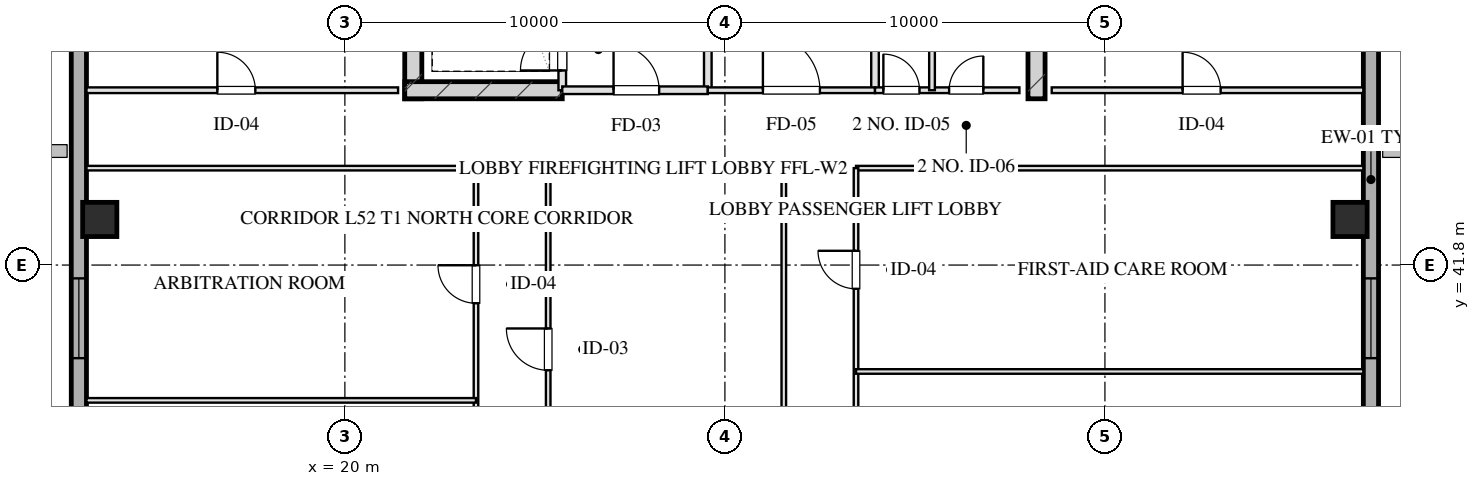
"""IFC4 building model, lengths in metres.
Left out: names, types, materials, properties, quantities, classifications, styles, units other than length and angle.
Written with IfcOpenShell. Run it as: python <this file> out.ifc"""

import sys

from ifc_helpers import new_model, si_unit, direction, frame, frame_2d, origin, origin_2d, place, context, subcontext, project, spatial, rectangle, hollow_rectangle, extrude, element, fill, save


model = new_model("IFC4")
c1 = context("Model", 3, precision=1e-05, world=origin(), true_north=direction((0.0, 1.0)))
c2 = subcontext(c1, "Body", "Model", "MODEL_VIEW")
j1 = project(units=[si_unit("LENGTHUNIT", "METRE"), si_unit("PLANEANGLEUNIT", "RADIAN")], contexts=[c1])
p1 = place(None, origin())
s1 = spatial("IfcSite", under=j1, at=p1, CompositionType="ELEMENT")
p2 = place(p1, origin())
s2 = spatial("IfcBuilding", under=s1, at=p2, CompositionType="ELEMENT")
p3 = place(p2, frame((0.0, 0.0, 195.5)))
s3 = spatial("IfcBuildingStorey", under=s2, at=p3, CompositionType="ELEMENT", Elevation=195.5)
for number, where, z_axis, x_axis in (
    (1, (21.8, 46.175, 0.0), (0.0, 0.0, 1.0), (0.0, 1.0, 0.0)),
    (2, (38.2, 46.175, 0.0), (0.0, 0.0, 1.0), (0.0, 1.0, 0.0)),
):
    element("IfcWall", number, at=place(p3, frame(where, z_axis=z_axis, x_axis=x_axis)), inside=s3, PredefinedType="SHEAR", context=c2, shape_type="SweptSolid", body=[
        extrude(rectangle(XDim=9.33, YDim=0.45, at=frame_2d((4.665, 0.0))), origin(), (0.0, 0.0, 1.0), 3.45),
    ])
p4 = place(p3, frame((21.575, 46.4, 0.0), z_axis=(0.0, 0.0, 1.0), x_axis=(1.0, 0.0, 0.0)))
e3 = element("IfcWall", 3, at=p4, inside=s3, PredefinedType="SHEAR", context=c2, shape_type="SweptSolid", body=[
    extrude(rectangle(XDim=4.145, YDim=0.45, at=frame_2d((2.073, 0.0))), origin(), (0.0, 0.0, 1.0), 3.45),
])
for number, where, z_axis, x_axis in (
    (4, (13.55, 43.0, 0.0), (0.0, 0.0, 1.0), (1.0, 0.0, 0.0)),
    (5, (46.45, 43.0, 0.0), (0.0, 0.0, 1.0), (1.0, 0.0, 0.0)),
):
    element("IfcColumn", number, at=place(p3, frame(where, z_axis=z_axis, x_axis=x_axis)), inside=s3, PredefinedType="COLUMN", context=c2, shape_type="SweptSolid", body=[
        extrude(hollow_rectangle(XDim=0.9, YDim=0.9, WallThickness=0.032, at=origin_2d()), origin(), (0.0, 0.0, 1.0), 3.451),
    ])
p5 = place(p3, frame((13.0, 10.8, 0.0), z_axis=(0.0, 0.0, 1.0), x_axis=(0.0, 1.0, 0.0)))
e6 = element("IfcWall", 6, at=p5, inside=s3, PredefinedType="SOLIDWALL", context=c2, shape_type="SweptSolid", body=[
    extrude(rectangle(XDim=46.4, YDim=0.4, at=frame_2d((23.2, 0.0))), origin(), (0.0, 0.0, 1.0), 2.61),
])
p6 = place(p5, frame((24.75, 0.0, 0.75)))
e7 = element("IfcOpeningElement", 7, at=p6, cuts=e6, PredefinedType="OPENING", context=c2, shape_type="SweptSolid", body=[
    extrude(rectangle(XDim=2.1, YDim=1.46, at=frame_2d((1.05, 0.73))), frame((0.0, 0.21, 0.0), z_axis=(0.0, -1.0, 0.0), x_axis=(1.0, 0.0, 0.0)), (0.0, 0.0, 1.0), 0.42),
])
p7 = place(p5, frame((28.55, 0.0, 0.75)))
e8 = element("IfcOpeningElement", 8, at=p7, cuts=e6, PredefinedType="OPENING", context=c2, shape_type="SweptSolid", body=[
    extrude(rectangle(XDim=2.1, YDim=1.46, at=frame_2d((1.05, 0.73))), frame((0.0, 0.21, 0.0), z_axis=(0.0, -1.0, 0.0), x_axis=(1.0, 0.0, 0.0)), (0.0, 0.0, 1.0), 0.42),
])
p8 = place(p5, frame((19.55, 0.0, 0.0)))
e9 = element("IfcOpeningElement", 9, at=p8, cuts=e6, PredefinedType="OPENING", context=c2, shape_type="SweptSolid", body=[
    extrude(rectangle(XDim=1.1, YDim=2.15, at=frame_2d((0.55, 1.075))), frame((0.0, 0.21, 0.0), z_axis=(0.0, -1.0, 0.0), x_axis=(1.0, 0.0, 0.0)), (0.0, 0.0, 1.0), 0.42),
])
p9 = place(p3, frame((47.0, 57.2, 0.0), z_axis=(0.0, 0.0, 1.0), x_axis=(0.0, -1.0, 0.0)))
e10 = element("IfcWall", 10, at=p9, inside=s3, PredefinedType="SOLIDWALL", context=c2, shape_type="SweptSolid", body=[
    extrude(rectangle(XDim=46.4, YDim=0.4, at=frame_2d((23.2, 0.0))), origin(), (0.0, 0.0, 1.0), 2.61),
])
p10 = place(p9, frame((19.55, 0.0, 0.75)))
e11 = element("IfcOpeningElement", 11, at=p10, cuts=e10, PredefinedType="OPENING", context=c2, shape_type="SweptSolid", body=[
    extrude(rectangle(XDim=2.1, YDim=1.46, at=frame_2d((1.05, 0.73))), frame((0.0, 0.21, 0.0), z_axis=(0.0, -1.0, 0.0), x_axis=(1.0, 0.0, 0.0)), (0.0, 0.0, 1.0), 0.42),
])
p11 = place(p9, frame((15.75, 0.0, 0.75)))
e12 = element("IfcOpeningElement", 12, at=p11, cuts=e10, PredefinedType="OPENING", context=c2, shape_type="SweptSolid", body=[
    extrude(rectangle(XDim=2.1, YDim=1.46, at=frame_2d((1.05, 0.73))), frame((0.0, 0.21, 0.0), z_axis=(0.0, -1.0, 0.0), x_axis=(1.0, 0.0, 0.0)), (0.0, 0.0, 1.0), 0.42),
])
p12 = place(p9, frame((27.05, 0.0, 0.0)))
e13 = element("IfcOpeningElement", 13, at=p12, cuts=e10, PredefinedType="OPENING", context=c2, shape_type="SweptSolid", body=[
    extrude(rectangle(XDim=1.1, YDim=2.15, at=frame_2d((0.55, 1.075))), frame((0.0, 0.21, 0.0), z_axis=(0.0, -1.0, 0.0), x_axis=(1.0, 0.0, 0.0)), (0.0, 0.0, 1.0), 0.42),
])
p13 = place(p3, frame((25.72, 46.4, 0.0), z_axis=(0.0, 0.0, 1.0), x_axis=(0.0, 1.0, 0.0)))
e14 = element("IfcWall", 14, at=p13, inside=s3, PredefinedType="PARTITIONING", context=c2, shape_type="SweptSolid", body=[
    extrude(rectangle(XDim=1.9, YDim=0.2, at=frame_2d((0.95, 0.0))), origin(), (0.0, 0.0, 1.0), 3.175),
])
p14 = place(p13, frame((0.52, 0.0, 0.0)))
e15 = element("IfcOpeningElement", 15, at=p14, cuts=e14, PredefinedType="OPENING", context=c2, shape_type="SweptSolid", body=[
    extrude(rectangle(XDim=1.1, YDim=2.05, at=frame_2d((0.55, 1.025))), frame((0.0, 0.11, 0.0), z_axis=(0.0, -1.0, 0.0), x_axis=(1.0, 0.0, 0.0)), (0.0, 0.0, 1.0), 0.22),
])
p15 = place(p3, frame((29.55, 46.4, 0.0), z_axis=(0.0, 0.0, 1.0), x_axis=(0.0, 1.0, 0.0)))
e16 = element("IfcWall", 16, at=p15, inside=s3, PredefinedType="PARTITIONING", context=c2, shape_type="SweptSolid", body=[
    extrude(rectangle(XDim=8.43, YDim=0.2, at=frame_2d((4.215, 0.0))), origin(), (0.0, 0.0, 1.0), 3.175),
])
p16 = place(p3, frame((25.72, 46.4, 0.0), z_axis=(0.0, 0.0, 1.0), x_axis=(1.0, 0.0, 0.0)))
e17 = element("IfcWall", 17, at=p16, inside=s3, PredefinedType="PARTITIONING", context=c2, shape_type="SweptSolid", body=[
    extrude(rectangle(XDim=3.83, YDim=0.2, at=frame_2d((1.915, 0.0))), origin(), (0.0, 0.0, 1.0), 3.175),
])
p17 = place(p16, frame((1.35, 0.0, 0.0)))
e18 = element("IfcOpeningElement", 18, at=p17, cuts=e17, PredefinedType="OPENING", context=c2, shape_type="SweptSolid", body=[
    extrude(rectangle(XDim=1.2, YDim=2.05, at=frame_2d((0.6, 1.025))), frame((0.0, 0.11, 0.0), z_axis=(0.0, -1.0, 0.0), x_axis=(1.0, 0.0, 0.0)), (0.0, 0.0, 1.0), 0.22),
])
p18 = place(p3, frame((33.95, 46.4, 0.0), z_axis=(0.0, 0.0, 1.0), x_axis=(0.0, 1.0, 0.0)))
e19 = element("IfcWall", 19, at=p18, inside=s3, PredefinedType="PARTITIONING", context=c2, shape_type="SweptSolid", body=[
    extrude(rectangle(XDim=8.43, YDim=0.2, at=frame_2d((4.215, 0.0))), origin(), (0.0, 0.0, 1.0), 3.175),
])
p19 = place(p3, frame((29.55, 46.4, 0.0), z_axis=(0.0, 0.0, 1.0), x_axis=(1.0, 0.0, 0.0)))
e20 = element("IfcWall", 20, at=p19, inside=s3, PredefinedType="PARTITIONING", context=c2, shape_type="SweptSolid", body=[
    extrude(rectangle(XDim=4.4, YDim=0.15, at=frame_2d((2.2, 0.0))), origin(), (0.0, 0.0, 1.0), 3.175),
])
p20 = place(p19, frame((1.45, 0.0, 0.0)))
e21 = element("IfcOpeningElement", 21, at=p20, cuts=e20, PredefinedType="OPENING", context=c2, shape_type="SweptSolid", body=[
    extrude(rectangle(XDim=1.5, YDim=2.05, at=frame_2d((0.75, 1.025))), frame((0.0, 0.085, 0.0), z_axis=(0.0, -1.0, 0.0), x_axis=(1.0, 0.0, 0.0)), (0.0, 0.0, 1.0), 0.17),
])
p21 = place(p3, frame((33.95, 46.4, 0.0), z_axis=(0.0, 0.0, 1.0), x_axis=(1.0, 0.0, 0.0)))
e22 = element("IfcWall", 22, at=p21, inside=s3, PredefinedType="PARTITIONING", context=c2, shape_type="SweptSolid", body=[
    extrude(rectangle(XDim=3.8, YDim=0.15, at=frame_2d((1.9, 0.0))), origin(), (0.0, 0.0, 1.0), 3.175),
])
p22 = place(p21, frame((0.22, 0.0, 0.0)))
e23 = element("IfcOpeningElement", 23, at=p22, cuts=e22, PredefinedType="OPENING", context=c2, shape_type="SweptSolid", body=[
    extrude(rectangle(XDim=0.95, YDim=2.05, at=frame_2d((0.475, 1.025))), frame((0.0, 0.085, 0.0), z_axis=(0.0, -1.0, 0.0), x_axis=(1.0, 0.0, 0.0)), (0.0, 0.0, 1.0), 0.17),
])
p23 = place(p21, frame((1.95, 0.0, 0.0)))
e24 = element("IfcOpeningElement", 24, at=p23, cuts=e22, PredefinedType="OPENING", context=c2, shape_type="SweptSolid", body=[
    extrude(rectangle(XDim=0.9, YDim=2.05, at=frame_2d((0.45, 1.025))), frame((0.0, 0.085, 0.0), z_axis=(0.0, -1.0, 0.0), x_axis=(1.0, 0.0, 0.0)), (0.0, 0.0, 1.0), 0.17),
])
p24 = place(p3, frame((35.45, 46.4, 0.0), z_axis=(0.0, 0.0, 1.0), x_axis=(0.0, 1.0, 0.0)))
e25 = element("IfcWall", 25, at=p24, inside=s3, PredefinedType="PARTITIONING", context=c2, shape_type="SweptSolid", body=[
    extrude(rectangle(XDim=8.43, YDim=0.15, at=frame_2d((4.215, 0.0))), origin(), (0.0, 0.0, 1.0), 2.765),
])
p25 = place(p24, frame((2.55, 0.0, 0.0)))
e26 = element("IfcOpeningElement", 26, at=p25, cuts=e25, PredefinedType="OPENING", context=c2, shape_type="SweptSolid", body=[
    extrude(rectangle(XDim=0.95, YDim=2.05, at=frame_2d((0.475, 1.025))), frame((0.0, 0.085, 0.0), z_axis=(0.0, -1.0, 0.0), x_axis=(1.0, 0.0, 0.0)), (0.0, 0.0, 1.0), 0.17),
])
p26 = place(p24, frame((5.6, 0.0, 0.0)))
e27 = element("IfcOpeningElement", 27, at=p26, cuts=e25, PredefinedType="OPENING", context=c2, shape_type="SweptSolid", body=[
    extrude(rectangle(XDim=0.9, YDim=2.05, at=frame_2d((0.45, 1.025))), frame((0.0, 0.085, 0.0), z_axis=(0.0, -1.0, 0.0), x_axis=(1.0, 0.0, 0.0)), (0.0, 0.0, 1.0), 0.17),
])
p27 = place(p3, frame((13.2, 46.4, 0.0), z_axis=(0.0, 0.0, 1.0), x_axis=(1.0, 0.0, 0.0)))
e28 = element("IfcWall", 28, at=p27, inside=s3, PredefinedType="PARTITIONING", context=c2, shape_type="SweptSolid", body=[
    extrude(rectangle(XDim=8.2, YDim=0.15, at=frame_2d((4.1, 0.0))), origin(), (0.0, 0.0, 1.0), 3.175),
])
p28 = place(p27, frame((3.444, 0.0, 0.0)))
e29 = element("IfcOpeningElement", 29, at=p28, cuts=e28, PredefinedType="OPENING", context=c2, shape_type="SweptSolid", body=[
    extrude(rectangle(XDim=1.0, YDim=2.05, at=frame_2d((0.5, 1.025))), frame((0.0, 0.085, 0.0), z_axis=(0.0, -1.0, 0.0), x_axis=(1.0, 0.0, 0.0)), (0.0, 0.0, 1.0), 0.17),
])
p29 = place(p3, frame((38.6, 46.4, 0.0), z_axis=(0.0, 0.0, 1.0), x_axis=(1.0, 0.0, 0.0)))
e30 = element("IfcWall", 30, at=p29, inside=s3, PredefinedType="PARTITIONING", context=c2, shape_type="SweptSolid", body=[
    extrude(rectangle(XDim=8.2, YDim=0.15, at=frame_2d((4.1, 0.0))), origin(), (0.0, 0.0, 1.0), 3.175),
])
p30 = place(p29, frame((3.444, 0.0, 0.0)))
e31 = element("IfcOpeningElement", 31, at=p30, cuts=e30, PredefinedType="OPENING", context=c2, shape_type="SweptSolid", body=[
    extrude(rectangle(XDim=1.0, YDim=2.05, at=frame_2d((0.5, 1.025))), frame((0.0, 0.085, 0.0), z_axis=(0.0, -1.0, 0.0), x_axis=(1.0, 0.0, 0.0)), (0.0, 0.0, 1.0), 0.17),
])
p31 = place(p3, frame((13.2, 44.35, 0.0), z_axis=(0.0, 0.0, 1.0), x_axis=(1.0, 0.0, 0.0)))
e32 = element("IfcWall", 32, at=p31, inside=s3, PredefinedType="PARTITIONING", context=c2, shape_type="SweptSolid", body=[
    extrude(rectangle(XDim=10.25, YDim=0.12, at=frame_2d((5.125, 0.0))), origin(), (0.0, 0.0, 1.0), 3.175),
])
p32 = place(p3, frame((25.35, 44.35, 0.0), z_axis=(0.0, 0.0, 1.0), x_axis=(1.0, 0.0, 0.0)))
e33 = element("IfcWall", 33, at=p32, inside=s3, PredefinedType="PARTITIONING", context=c2, shape_type="SweptSolid", body=[
    extrude(rectangle(XDim=6.2, YDim=0.12, at=frame_2d((3.1, 0.0))), origin(), (0.0, 0.0, 1.0), 3.175),
])
p33 = place(p3, frame((33.45, 44.35, 0.0), z_axis=(0.0, 0.0, 1.0), x_axis=(1.0, 0.0, 0.0)))
e34 = element("IfcWall", 34, at=p33, inside=s3, PredefinedType="PARTITIONING", context=c2, shape_type="SweptSolid", body=[
    extrude(rectangle(XDim=13.35, YDim=0.12, at=frame_2d((6.675, 0.0))), origin(), (0.0, 0.0, 1.0), 3.175),
])
p34 = place(p3, frame((23.45, 23.65, 0.0), z_axis=(0.0, 0.0, 1.0), x_axis=(0.0, 1.0, 0.0)))
e35 = element("IfcWall", 35, at=p34, inside=s3, PredefinedType="PARTITIONING", context=c2, shape_type="SweptSolid", body=[
    extrude(rectangle(XDim=20.7, YDim=0.12, at=frame_2d((10.35, 0.0))), origin(), (0.0, 0.0, 1.0), 3.175),
])
p35 = place(p34, frame((2.175, 0.0, 0.0)))
e36 = element("IfcOpeningElement", 36, at=p35, cuts=e35, PredefinedType="OPENING", context=c2, shape_type="SweptSolid", body=[
    extrude(rectangle(XDim=1.0, YDim=2.05, at=frame_2d((0.5, 1.025))), frame((0.0, 0.07, 0.0), z_axis=(0.0, -1.0, 0.0), x_axis=(1.0, 0.0, 0.0)), (0.0, 0.0, 1.0), 0.14),
])
p36 = place(p34, frame((6.883, 0.0, 0.0)))
e37 = element("IfcOpeningElement", 37, at=p36, cuts=e35, PredefinedType="OPENING", context=c2, shape_type="SweptSolid", body=[
    extrude(rectangle(XDim=1.0, YDim=2.05, at=frame_2d((0.5, 1.025))), frame((0.0, 0.07, 0.0), z_axis=(0.0, -1.0, 0.0), x_axis=(1.0, 0.0, 0.0)), (0.0, 0.0, 1.0), 0.14),
])
p37 = place(p34, frame((11.502, 0.0, 0.0)))
e38 = element("IfcOpeningElement", 38, at=p37, cuts=e35, PredefinedType="OPENING", context=c2, shape_type="SweptSolid", body=[
    extrude(rectangle(XDim=1.05, YDim=2.05, at=frame_2d((0.525, 1.025))), frame((0.0, 0.07, 0.0), z_axis=(0.0, -1.0, 0.0), x_axis=(1.0, 0.0, 0.0)), (0.0, 0.0, 1.0), 0.14),
])
p38 = place(p34, frame((17.145, 0.0, 0.0)))
e39 = element("IfcOpeningElement", 39, at=p38, cuts=e35, PredefinedType="OPENING", context=c2, shape_type="SweptSolid", body=[
    extrude(rectangle(XDim=1.0, YDim=2.05, at=frame_2d((0.5, 1.025))), frame((0.0, 0.07, 0.0), z_axis=(0.0, -1.0, 0.0), x_axis=(1.0, 0.0, 0.0)), (0.0, 0.0, 1.0), 0.14),
])
p39 = place(p3, frame((25.35, 23.65, 0.0), z_axis=(0.0, 0.0, 1.0), x_axis=(0.0, 1.0, 0.0)))
e40 = element("IfcWall", 40, at=p39, inside=s3, PredefinedType="PARTITIONING", context=c2, shape_type="SweptSolid", body=[
    extrude(rectangle(XDim=20.7, YDim=0.12, at=frame_2d((10.35, 0.0))), origin(), (0.0, 0.0, 1.0), 3.175),
])
p40 = place(p39, frame((4.963, 0.0, 0.0)))
e41 = element("IfcOpeningElement", 41, at=p40, cuts=e40, PredefinedType="OPENING", context=c2, shape_type="SweptSolid", body=[
    extrude(rectangle(XDim=1.1, YDim=2.05, at=frame_2d((0.55, 1.025))), frame((0.0, 0.07, 0.0), z_axis=(0.0, -1.0, 0.0), x_axis=(1.0, 0.0, 0.0)), (0.0, 0.0, 1.0), 0.14),
])
p41 = place(p39, frame((15.382, 0.0, 0.0)))
e42 = element("IfcOpeningElement", 42, at=p41, cuts=e40, PredefinedType="OPENING", context=c2, shape_type="SweptSolid", body=[
    extrude(rectangle(XDim=1.1, YDim=2.05, at=frame_2d((0.55, 1.025))), frame((0.0, 0.07, 0.0), z_axis=(0.0, -1.0, 0.0), x_axis=(1.0, 0.0, 0.0)), (0.0, 0.0, 1.0), 0.14),
])
p42 = place(p3, frame((31.55, 23.65, 0.0), z_axis=(0.0, 0.0, 1.0), x_axis=(0.0, 1.0, 0.0)))
e43 = element("IfcWall", 43, at=p42, inside=s3, PredefinedType="PARTITIONING", context=c2, shape_type="SweptSolid", body=[
    extrude(rectangle(XDim=20.7, YDim=0.12, at=frame_2d((10.35, 0.0))), origin(), (0.0, 0.0, 1.0), 3.175),
])
p43 = place(p3, frame((33.45, 23.65, 0.0), z_axis=(0.0, 0.0, 1.0), x_axis=(0.0, 1.0, 0.0)))
e44 = element("IfcWall", 44, at=p43, inside=s3, PredefinedType="PARTITIONING", context=c2, shape_type="SweptSolid", body=[
    extrude(rectangle(XDim=20.7, YDim=0.12, at=frame_2d((10.35, 0.0))), origin(), (0.0, 0.0, 1.0), 3.175),
])
p44 = place(p43, frame((0.775, 0.0, 0.0)))
e45 = element("IfcOpeningElement", 45, at=p44, cuts=e44, PredefinedType="OPENING", context=c2, shape_type="SweptSolid", body=[
    extrude(rectangle(XDim=1.0, YDim=2.05, at=frame_2d((0.5, 1.025))), frame((0.0, 0.07, 0.0), z_axis=(0.0, -1.0, 0.0), x_axis=(1.0, 0.0, 0.0)), (0.0, 0.0, 1.0), 0.14),
])
p45 = place(p43, frame((5.35, 0.0, 0.0)))
e46 = element("IfcOpeningElement", 46, at=p45, cuts=e44, PredefinedType="OPENING", context=c2, shape_type="SweptSolid", body=[
    extrude(rectangle(XDim=1.0, YDim=2.05, at=frame_2d((0.5, 1.025))), frame((0.0, 0.07, 0.0), z_axis=(0.0, -1.0, 0.0), x_axis=(1.0, 0.0, 0.0)), (0.0, 0.0, 1.0), 0.14),
])
p46 = place(p43, frame((9.85, 0.0, 0.0)))
e47 = element("IfcOpeningElement", 47, at=p46, cuts=e44, PredefinedType="OPENING", context=c2, shape_type="SweptSolid", body=[
    extrude(rectangle(XDim=1.0, YDim=2.05, at=frame_2d((0.5, 1.025))), frame((0.0, 0.07, 0.0), z_axis=(0.0, -1.0, 0.0), x_axis=(1.0, 0.0, 0.0)), (0.0, 0.0, 1.0), 0.14),
])
p47 = place(p43, frame((12.95, 0.0, 0.0)))
e48 = element("IfcOpeningElement", 48, at=p47, cuts=e44, PredefinedType="OPENING", context=c2, shape_type="SweptSolid", body=[
    extrude(rectangle(XDim=1.05, YDim=2.05, at=frame_2d((0.525, 1.025))), frame((0.0, 0.07, 0.0), z_axis=(0.0, -1.0, 0.0), x_axis=(1.0, 0.0, 0.0)), (0.0, 0.0, 1.0), 0.14),
])
p48 = place(p43, frame((17.525, 0.0, 0.0)))
e49 = element("IfcOpeningElement", 49, at=p48, cuts=e44, PredefinedType="OPENING", context=c2, shape_type="SweptSolid", body=[
    extrude(rectangle(XDim=1.0, YDim=2.05, at=frame_2d((0.5, 1.025))), frame((0.0, 0.07, 0.0), z_axis=(0.0, -1.0, 0.0), x_axis=(1.0, 0.0, 0.0)), (0.0, 0.0, 1.0), 0.14),
])
p49 = place(p3, frame((13.2, 38.24, 0.0), z_axis=(0.0, 0.0, 1.0), x_axis=(1.0, 0.0, 0.0)))
e50 = element("IfcWall", 50, at=p49, inside=s3, PredefinedType="PARTITIONING", context=c2, shape_type="SweptSolid", body=[
    extrude(rectangle(XDim=10.25, YDim=0.12, at=frame_2d((5.125, 0.0))), origin(), (0.0, 0.0, 1.0), 3.175),
])
p50 = place(p3, frame((33.45, 39.0, 0.0), z_axis=(0.0, 0.0, 1.0), x_axis=(1.0, 0.0, 0.0)))
e51 = element("IfcWall", 51, at=p50, inside=s3, PredefinedType="PARTITIONING", context=c2, shape_type="SweptSolid", body=[
    extrude(rectangle(XDim=13.35, YDim=0.12, at=frame_2d((6.675, 0.0))), origin(), (0.0, 0.0, 1.0), 3.175),
])
p51 = place(p7, origin())
e52 = element("IfcWindow", 52, at=p51, inside=s3, PartitioningType="TRIPLE_PANEL_VERTICAL", PredefinedType="WINDOW", context=c2, shape_type="SweptSolid", body=[
    extrude(rectangle(XDim=2.1, YDim=1.46, at=frame_2d((1.05, 0.73))), frame((0.0, 0.03, 0.0), z_axis=(0.0, -1.0, 0.0), x_axis=(1.0, 0.0, 0.0)), (0.0, 0.0, 1.0), 0.06),
])
fill(e8, e52)
p52 = place(p11, origin())
e53 = element("IfcWindow", 53, at=p52, inside=s3, PartitioningType="TRIPLE_PANEL_VERTICAL", PredefinedType="WINDOW", context=c2, shape_type="SweptSolid", body=[
    extrude(rectangle(XDim=2.1, YDim=1.46, at=frame_2d((1.05, 0.73))), frame((0.0, 0.03, 0.0), z_axis=(0.0, -1.0, 0.0), x_axis=(1.0, 0.0, 0.0)), (0.0, 0.0, 1.0), 0.06),
])
fill(e12, e53)
p53 = place(p14, origin())
e54 = element("IfcDoor", 54, at=p53, inside=s3, OperationType="SINGLE_SWING_LEFT", PredefinedType="DOOR", context=c2, shape_type="SweptSolid", body=[
    extrude(rectangle(XDim=1.1, YDim=2.05, at=frame_2d((0.55, 1.025))), frame((0.0, 0.025, 0.0), z_axis=(0.0, -1.0, 0.0), x_axis=(1.0, 0.0, 0.0)), (0.0, 0.0, 1.0), 0.05),
])
fill(e15, e54)
p54 = place(p17, origin())
e55 = element("IfcDoor", 55, at=p54, inside=s3, OperationType="SINGLE_SWING_LEFT", PredefinedType="DOOR", context=c2, shape_type="SweptSolid", body=[
    extrude(rectangle(XDim=1.2, YDim=2.05, at=frame_2d((0.6, 1.025))), frame((0.0, 0.025, 0.0), z_axis=(0.0, -1.0, 0.0), x_axis=(1.0, 0.0, 0.0)), (0.0, 0.0, 1.0), 0.05),
])
fill(e18, e55)
p55 = place(p20, origin())
e56 = element("IfcDoor", 56, at=p55, inside=s3, OperationType="SINGLE_SWING_LEFT", PredefinedType="DOOR", context=c2, shape_type="SweptSolid", body=[
    extrude(rectangle(XDim=1.5, YDim=2.05, at=frame_2d((0.75, 1.025))), frame((0.0, 0.025, 0.0), z_axis=(0.0, -1.0, 0.0), x_axis=(1.0, 0.0, 0.0)), (0.0, 0.0, 1.0), 0.05),
])
fill(e21, e56)
p56 = place(p22, origin())
e57 = element("IfcDoor", 57, at=p56, inside=s3, OperationType="SINGLE_SWING_LEFT", PredefinedType="DOOR", context=c2, shape_type="SweptSolid", body=[
    extrude(rectangle(XDim=0.95, YDim=2.05, at=frame_2d((0.475, 1.025))), frame((0.0, 0.025, 0.0), z_axis=(0.0, -1.0, 0.0), x_axis=(1.0, 0.0, 0.0)), (0.0, 0.0, 1.0), 0.05),
])
fill(e23, e57)
p57 = place(p23, origin())
e58 = element("IfcDoor", 58, at=p57, inside=s3, OperationType="SINGLE_SWING_RIGHT", PredefinedType="DOOR", context=c2, shape_type="SweptSolid", body=[
    extrude(rectangle(XDim=0.9, YDim=2.05, at=frame_2d((0.45, 1.025))), frame((0.0, 0.025, 0.0), z_axis=(0.0, -1.0, 0.0), x_axis=(1.0, 0.0, 0.0)), (0.0, 0.0, 1.0), 0.05),
])
fill(e24, e58)
p58 = place(p28, origin())
e59 = element("IfcDoor", 59, at=p58, inside=s3, OperationType="SINGLE_SWING_LEFT", PredefinedType="DOOR", context=c2, shape_type="SweptSolid", body=[
    extrude(rectangle(XDim=1.0, YDim=2.05, at=frame_2d((0.5, 1.025))), frame((0.0, 0.025, 0.0), z_axis=(0.0, -1.0, 0.0), x_axis=(1.0, 0.0, 0.0)), (0.0, 0.0, 1.0), 0.05),
])
fill(e29, e59)
p59 = place(p30, origin())
e60 = element("IfcDoor", 60, at=p59, inside=s3, OperationType="SINGLE_SWING_LEFT", PredefinedType="DOOR", context=c2, shape_type="SweptSolid", body=[
    extrude(rectangle(XDim=1.0, YDim=2.05, at=frame_2d((0.5, 1.025))), frame((0.0, 0.025, 0.0), z_axis=(0.0, -1.0, 0.0), x_axis=(1.0, 0.0, 0.0)), (0.0, 0.0, 1.0), 0.05),
])
fill(e31, e60)
p60 = place(p38, origin())
e61 = element("IfcDoor", 61, at=p60, inside=s3, OperationType="SINGLE_SWING_RIGHT", PredefinedType="DOOR", context=c2, shape_type="SweptSolid", body=[
    extrude(rectangle(XDim=1.0, YDim=2.05, at=frame_2d((0.5, 1.025))), frame((0.0, 0.025, 0.0), z_axis=(0.0, -1.0, 0.0), x_axis=(1.0, 0.0, 0.0)), (0.0, 0.0, 1.0), 0.05),
])
fill(e39, e61)
p61 = place(p41, origin())
e62 = element("IfcDoor", 62, at=p61, inside=s3, OperationType="SINGLE_SWING_RIGHT", PredefinedType="DOOR", context=c2, shape_type="SweptSolid", body=[
    extrude(rectangle(XDim=1.1, YDim=2.05, at=frame_2d((0.55, 1.025))), frame((0.0, 0.025, 0.0), z_axis=(0.0, -1.0, 0.0), x_axis=(1.0, 0.0, 0.0)), (0.0, 0.0, 1.0), 0.05),
])
fill(e42, e62)
p62 = place(p48, origin())
e63 = element("IfcDoor", 63, at=p62, inside=s3, OperationType="SINGLE_SWING_RIGHT", PredefinedType="DOOR", context=c2, shape_type="SweptSolid", body=[
    extrude(rectangle(XDim=1.0, YDim=2.05, at=frame_2d((0.5, 1.025))), frame((0.0, 0.025, 0.0), z_axis=(0.0, -1.0, 0.0), x_axis=(1.0, 0.0, 0.0)), (0.0, 0.0, 1.0), 0.05),
])
fill(e49, e63)
save(model, sys.argv[1])
